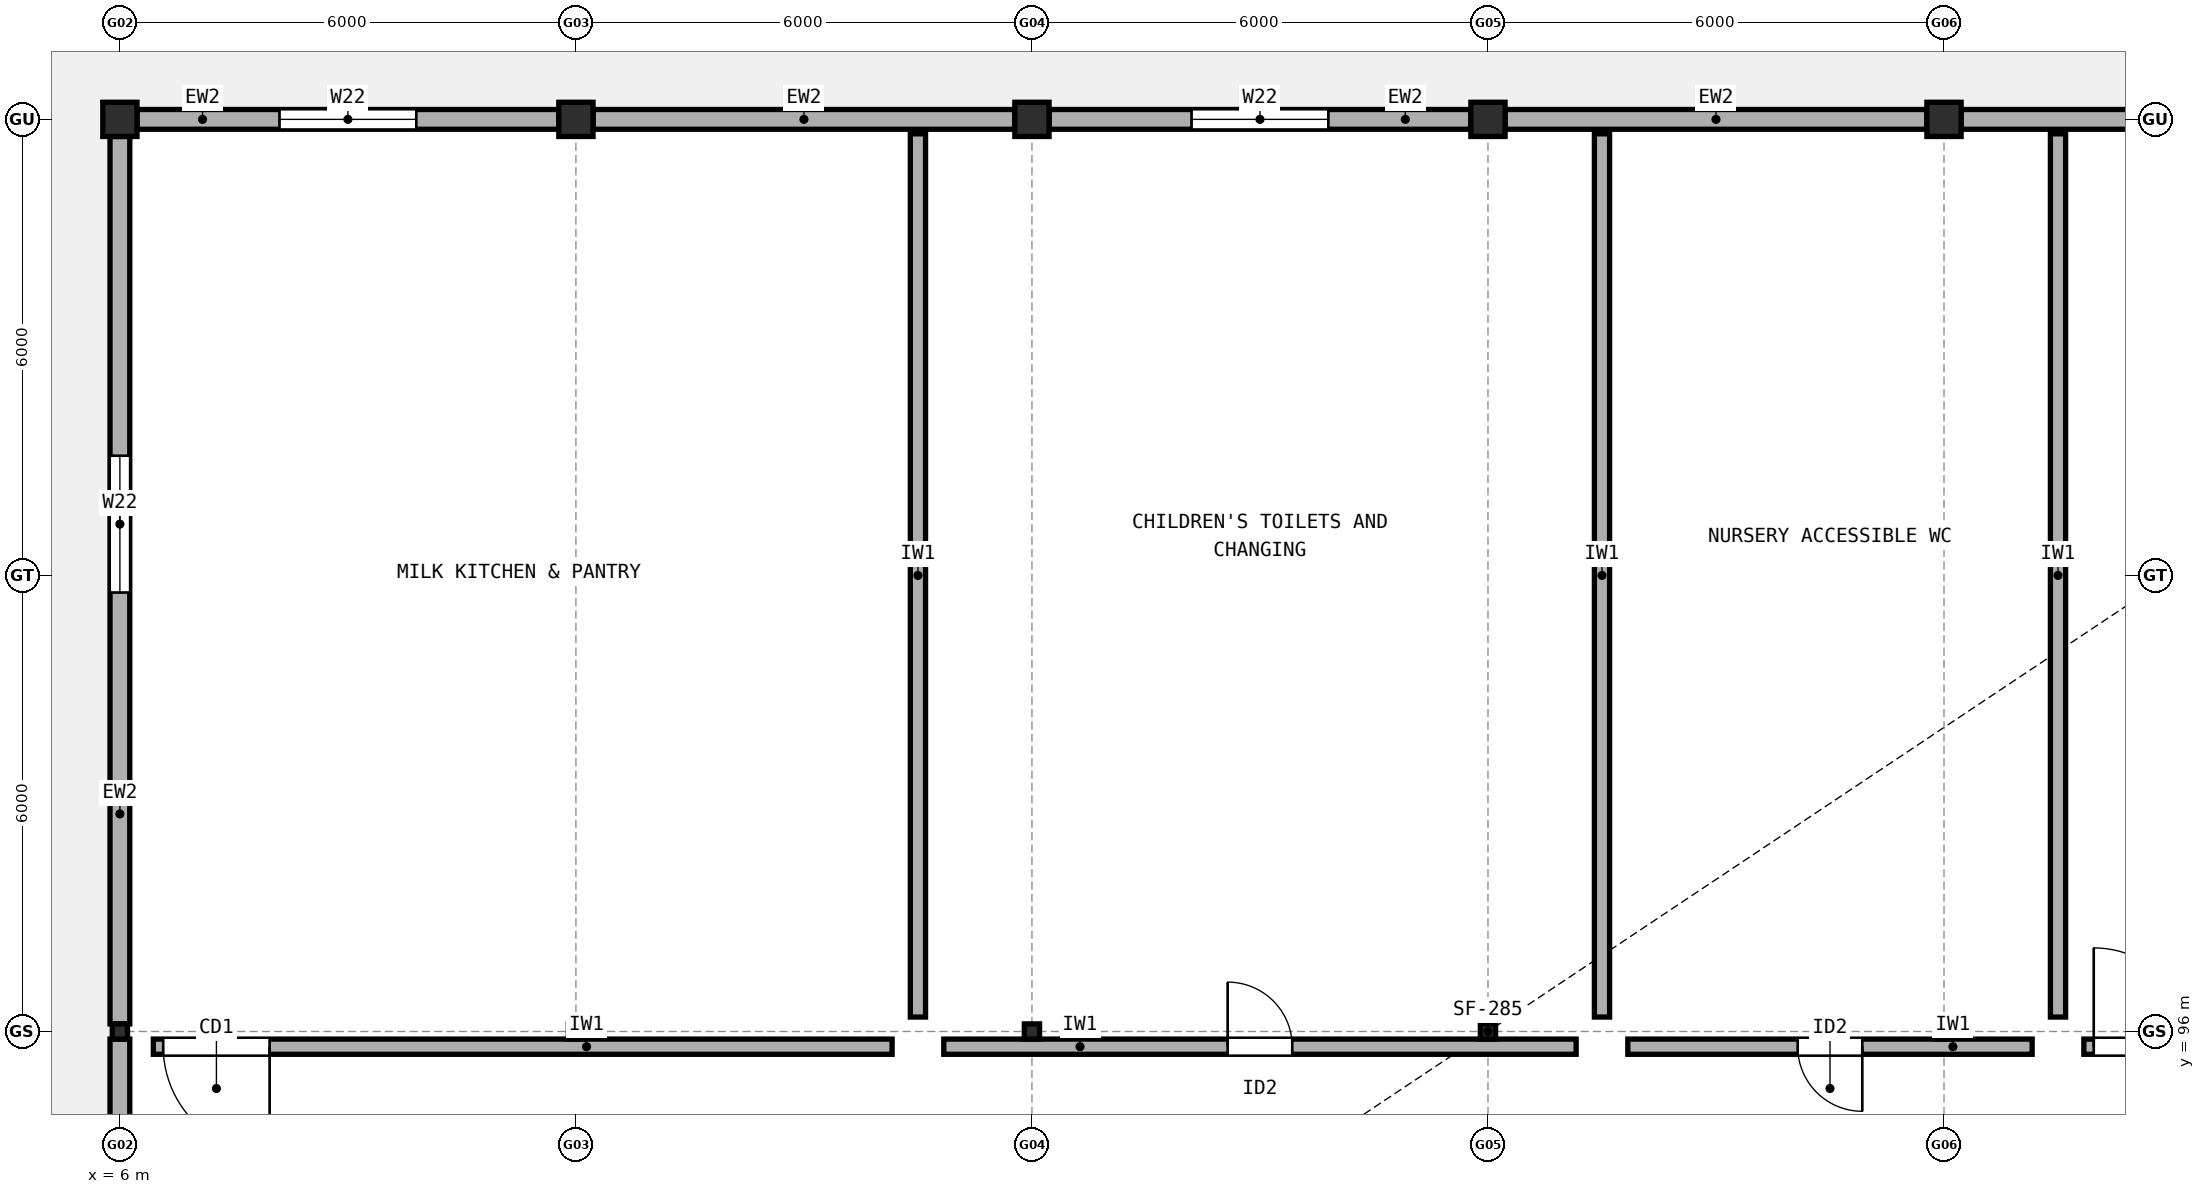
"""IFC4 building model, lengths in metres.
Left out: names, types, materials, properties, quantities, classifications, styles, units other than length and angle.
Written with IfcOpenShell. Run it as: python <this file> out.ifc"""

import sys

from ifc_helpers import new_model, si_unit, direction, frame, frame_2d, origin, origin_2d, place, context, subcontext, project, spatial, rectangle, i_section, extrude, element, fill, save


model = new_model("IFC4")
c1 = context("Model", 3, precision=1e-05, world=origin(), true_north=direction((0.0, 1.0)))
c2 = subcontext(c1, "Body", "Model", "MODEL_VIEW")
j1 = project(units=[si_unit("LENGTHUNIT", "METRE"), si_unit("PLANEANGLEUNIT", "RADIAN")], contexts=[c1])
p1 = place(None, origin())
s1 = spatial("IfcSite", under=j1, at=p1, CompositionType="ELEMENT")
p2 = place(p1, origin())
s2 = spatial("IfcBuilding", under=s1, at=p2, CompositionType="ELEMENT")
p3 = place(p2, origin())
s3 = spatial("IfcBuildingStorey", under=s2, at=p3, CompositionType="ELEMENT", Elevation=0.0)
p4 = place(p3, frame((6.0, 96.0, 0.0), z_axis=(0.0, 0.0, 1.0), x_axis=(1.0, 0.0, 0.0)))
e1 = element("IfcColumn", 1, at=p4, inside=s3, PredefinedType="COLUMN", context=c2, shape_type="SweptSolid", body=[
    extrude(i_section(OverallWidth=0.2, OverallDepth=0.2, WebThickness=0.009, FlangeThickness=0.015, FilletRadius=0.018, at=origin_2d()), origin(), (0.0, 0.0, 1.0), 4.23),
])
p5 = place(p3, frame((6.0, 108.0, 0.0), z_axis=(0.0, 0.0, 1.0), x_axis=(1.0, 0.0, 0.0)))
e2 = element("IfcColumn", 2, at=p5, inside=s3, PredefinedType="COLUMN", context=c2, shape_type="SweptSolid", body=[
    extrude(rectangle(XDim=0.45, YDim=0.45, at=origin_2d()), origin(), (0.0, 0.0, 1.0), 4.23),
])
p6 = place(p3, frame((12.0, 96.0, 0.0), z_axis=(0.0, 0.0, 1.0), x_axis=(1.0, 0.0, 0.0)))
e3 = element("IfcColumn", 3, at=p6, inside=s3, PredefinedType="COLUMN", context=c2, shape_type="SweptSolid", body=[
    extrude(i_section(OverallWidth=0.2, OverallDepth=0.2, WebThickness=0.009, FlangeThickness=0.015, FilletRadius=0.018, at=origin_2d()), origin(), (0.0, 0.0, 1.0), 4.23),
])
p7 = place(p3, frame((12.0, 108.0, 0.0), z_axis=(0.0, 0.0, 1.0), x_axis=(1.0, 0.0, 0.0)))
e4 = element("IfcColumn", 4, at=p7, inside=s3, PredefinedType="COLUMN", context=c2, shape_type="SweptSolid", body=[
    extrude(rectangle(XDim=0.45, YDim=0.45, at=origin_2d()), origin(), (0.0, 0.0, 1.0), 4.23),
])
p8 = place(p3, frame((18.0, 96.0, 0.0), z_axis=(0.0, 0.0, 1.0), x_axis=(1.0, 0.0, 0.0)))
e5 = element("IfcColumn", 5, at=p8, inside=s3, PredefinedType="COLUMN", context=c2, shape_type="SweptSolid", body=[
    extrude(i_section(OverallWidth=0.2, OverallDepth=0.2, WebThickness=0.009, FlangeThickness=0.015, FilletRadius=0.018, at=origin_2d()), origin(), (0.0, 0.0, 1.0), 4.23),
])
p9 = place(p3, frame((18.0, 108.0, 0.0), z_axis=(0.0, 0.0, 1.0), x_axis=(1.0, 0.0, 0.0)))
e6 = element("IfcColumn", 6, at=p9, inside=s3, PredefinedType="COLUMN", context=c2, shape_type="SweptSolid", body=[
    extrude(rectangle(XDim=0.45, YDim=0.45, at=origin_2d()), origin(), (0.0, 0.0, 1.0), 4.23),
])
p10 = place(p3, frame((24.0, 96.0, 0.0), z_axis=(0.0, 0.0, 1.0), x_axis=(1.0, 0.0, 0.0)))
e7 = element("IfcColumn", 7, at=p10, inside=s3, PredefinedType="COLUMN", context=c2, shape_type="SweptSolid", body=[
    extrude(i_section(OverallWidth=0.2, OverallDepth=0.2, WebThickness=0.009, FlangeThickness=0.015, FilletRadius=0.018, at=origin_2d()), origin(), (0.0, 0.0, 1.0), 4.23),
])
p11 = place(p3, frame((24.0, 108.0, 0.0), z_axis=(0.0, 0.0, 1.0), x_axis=(1.0, 0.0, 0.0)))
e8 = element("IfcColumn", 8, at=p11, inside=s3, PredefinedType="COLUMN", context=c2, shape_type="SweptSolid", body=[
    extrude(rectangle(XDim=0.45, YDim=0.45, at=origin_2d()), origin(), (0.0, 0.0, 1.0), 4.23),
])
p12 = place(p3, frame((30.0, 96.0, 0.0), z_axis=(0.0, 0.0, 1.0), x_axis=(1.0, 0.0, 0.0)))
e9 = element("IfcColumn", 9, at=p12, inside=s3, PredefinedType="COLUMN", context=c2, shape_type="SweptSolid", body=[
    extrude(i_section(OverallWidth=0.2, OverallDepth=0.2, WebThickness=0.009, FlangeThickness=0.015, FilletRadius=0.018, at=origin_2d()), origin(), (0.0, 0.0, 1.0), 4.23),
])
p13 = place(p3, frame((30.0, 108.0, 0.0), z_axis=(0.0, 0.0, 1.0), x_axis=(1.0, 0.0, 0.0)))
e10 = element("IfcColumn", 10, at=p13, inside=s3, PredefinedType="COLUMN", context=c2, shape_type="SweptSolid", body=[
    extrude(rectangle(XDim=0.45, YDim=0.45, at=origin_2d()), origin(), (0.0, 0.0, 1.0), 4.23),
])
p14 = place(p3, frame((11.775, 108.0, 0.0), z_axis=(0.0, 0.0, 1.0), x_axis=(-1.0, 0.0, 0.0)))
e11 = element("IfcWall", 11, at=p14, inside=s3, PredefinedType="STANDARD", context=c2, shape_type="SweptSolid", body=[
    extrude(rectangle(XDim=5.55, YDim=0.26, at=frame_2d((2.775, 0.0))), origin(), (0.0, 0.0, 1.0), 3.112),
])
p15 = place(p14, frame((1.875, 0.0, 0.85)))
e12 = element("IfcOpeningElement", 12, at=p15, cuts=e11, PredefinedType="OPENING", context=c2, shape_type="SweptSolid", body=[
    extrude(rectangle(XDim=1.8, YDim=1.45, at=frame_2d((0.9, 0.725))), frame((0.0, 0.14, 0.0), z_axis=(0.0, -1.0, 0.0), x_axis=(1.0, 0.0, 0.0)), (0.0, 0.0, 1.0), 0.28),
])
p16 = place(p3, frame((17.775, 108.0, 0.0), z_axis=(0.0, 0.0, 1.0), x_axis=(-1.0, 0.0, 0.0)))
e13 = element("IfcWall", 13, at=p16, inside=s3, PredefinedType="STANDARD", context=c2, shape_type="SweptSolid", body=[
    extrude(rectangle(XDim=5.55, YDim=0.26, at=frame_2d((2.775, 0.0))), origin(), (0.0, 0.0, 1.0), 3.112),
])
p17 = place(p3, frame((23.775, 108.0, 0.0), z_axis=(0.0, 0.0, 1.0), x_axis=(-1.0, 0.0, 0.0)))
e14 = element("IfcWall", 14, at=p17, inside=s3, PredefinedType="STANDARD", context=c2, shape_type="SweptSolid", body=[
    extrude(rectangle(XDim=5.55, YDim=0.26, at=frame_2d((2.775, 0.0))), origin(), (0.0, 0.0, 1.0), 3.112),
])
p18 = place(p17, frame((1.875, 0.0, 0.85)))
e15 = element("IfcOpeningElement", 15, at=p18, cuts=e14, PredefinedType="OPENING", context=c2, shape_type="SweptSolid", body=[
    extrude(rectangle(XDim=1.8, YDim=1.45, at=frame_2d((0.9, 0.725))), frame((0.0, 0.14, 0.0), z_axis=(0.0, -1.0, 0.0), x_axis=(1.0, 0.0, 0.0)), (0.0, 0.0, 1.0), 0.28),
])
for number, where, z_axis, x_axis in (
    (16, (29.775, 108.0, 0.0), (0.0, 0.0, 1.0), (-1.0, 0.0, 0.0)),
    (17, (35.775, 108.0, 0.0), (0.0, 0.0, 1.0), (-1.0, 0.0, 0.0)),
):
    element("IfcWall", number, at=place(p3, frame(where, z_axis=z_axis, x_axis=x_axis)), inside=s3, PredefinedType="STANDARD", context=c2, shape_type="SweptSolid", body=[
        extrude(rectangle(XDim=5.55, YDim=0.26, at=frame_2d((2.775, 0.0))), origin(), (0.0, 0.0, 1.0), 3.112),
    ])
p19 = place(p3, frame((6.0, 95.9, 0.0), z_axis=(0.0, 0.0, 1.0), x_axis=(0.0, -1.0, 0.0)))
e18 = element("IfcWall", 18, at=p19, inside=s3, PredefinedType="STANDARD", context=c2, shape_type="SweptSolid", body=[
    extrude(rectangle(XDim=11.675, YDim=0.26, at=frame_2d((5.837, 0.0))), origin(), (0.0, 0.0, 1.0), 2.912),
])
p20 = place(p19, frame((4.2, 0.0, 0.85)))
e19 = element("IfcOpeningElement", 19, at=p20, cuts=e18, PredefinedType="OPENING", context=c2, shape_type="SweptSolid", body=[
    extrude(rectangle(XDim=1.8, YDim=1.45, at=frame_2d((0.9, 0.725))), frame((0.0, 0.14, 0.0), z_axis=(0.0, -1.0, 0.0), x_axis=(1.0, 0.0, 0.0)), (0.0, 0.0, 1.0), 0.28),
])
p21 = place(p3, frame((6.0, 107.775, 0.0), z_axis=(0.0, 0.0, 1.0), x_axis=(0.0, -1.0, 0.0)))
e20 = element("IfcWall", 20, at=p21, inside=s3, PredefinedType="STANDARD", context=c2, shape_type="SweptSolid", body=[
    extrude(rectangle(XDim=11.675, YDim=0.26, at=frame_2d((5.837, 0.0))), origin(), (0.0, 0.0, 1.0), 2.912),
])
p22 = place(p21, frame((4.2, 0.0, 0.85)))
e21 = element("IfcOpeningElement", 21, at=p22, cuts=e20, PredefinedType="OPENING", context=c2, shape_type="SweptSolid", body=[
    extrude(rectangle(XDim=1.8, YDim=1.45, at=frame_2d((0.9, 0.725))), frame((0.0, 0.14, 0.0), z_axis=(0.0, -1.0, 0.0), x_axis=(1.0, 0.0, 0.0)), (0.0, 0.0, 1.0), 0.28),
])
p23 = place(p3, frame((6.44, 95.8, 0.0), z_axis=(0.0, 0.0, 1.0), x_axis=(1.0, 0.0, 0.0)))
e22 = element("IfcWall", 22, at=p23, inside=s3, PredefinedType="SOLIDWALL", context=c2, shape_type="SweptSolid", body=[
    extrude(rectangle(XDim=9.72, YDim=0.2, at=frame_2d((4.86, 0.0))), origin(), (0.0, 0.0, 1.0), 3.562),
])
p24 = place(p23, frame((0.13, 0.0, 0.0)))
e23 = element("IfcOpeningElement", 23, at=p24, cuts=e22, PredefinedType="OPENING", context=c2, shape_type="SweptSolid", body=[
    extrude(rectangle(XDim=1.4, YDim=2.15, at=frame_2d((0.7, 1.075))), frame((0.0, 0.11, 0.0), z_axis=(0.0, -1.0, 0.0), x_axis=(1.0, 0.0, 0.0)), (0.0, 0.0, 1.0), 0.22),
])
p25 = place(p3, frame((16.5, 96.19, 0.0), z_axis=(0.0, 0.0, 1.0), x_axis=(0.0, 1.0, 0.0)))
e24 = element("IfcWall", 24, at=p25, inside=s3, PredefinedType="SOLIDWALL", context=c2, shape_type="SweptSolid", body=[
    extrude(rectangle(XDim=11.62, YDim=0.2, at=frame_2d((5.81, 0.0))), origin(), (0.0, 0.0, 1.0), 3.112),
])
p26 = place(p3, frame((16.84, 95.8, 0.0), z_axis=(0.0, 0.0, 1.0), x_axis=(1.0, 0.0, 0.0)))
e25 = element("IfcWall", 25, at=p26, inside=s3, PredefinedType="SOLIDWALL", context=c2, shape_type="SweptSolid", body=[
    extrude(rectangle(XDim=8.32, YDim=0.2, at=frame_2d((4.16, 0.0))), origin(), (0.0, 0.0, 1.0), 2.912),
])
p27 = place(p26, frame((3.735, 0.0, 0.0)))
e26 = element("IfcOpeningElement", 26, at=p27, cuts=e25, PredefinedType="OPENING", context=c2, shape_type="SweptSolid", body=[
    extrude(rectangle(XDim=0.85, YDim=2.1, at=frame_2d((0.425, 1.05))), frame((0.0, 0.11, 0.0), z_axis=(0.0, -1.0, 0.0), x_axis=(1.0, 0.0, 0.0)), (0.0, 0.0, 1.0), 0.22),
])
p28 = place(p3, frame((25.5, 96.19, 0.0), z_axis=(0.0, 0.0, 1.0), x_axis=(0.0, 1.0, 0.0)))
e27 = element("IfcWall", 27, at=p28, inside=s3, PredefinedType="SOLIDWALL", context=c2, shape_type="SweptSolid", body=[
    extrude(rectangle(XDim=11.62, YDim=0.2, at=frame_2d((5.81, 0.0))), origin(), (0.0, 0.0, 1.0), 3.112),
])
p29 = place(p3, frame((25.84, 95.8, 0.0), z_axis=(0.0, 0.0, 1.0), x_axis=(1.0, 0.0, 0.0)))
e28 = element("IfcWall", 28, at=p29, inside=s3, PredefinedType="SOLIDWALL", context=c2, shape_type="SweptSolid", body=[
    extrude(rectangle(XDim=5.32, YDim=0.2, at=frame_2d((2.66, 0.0))), origin(), (0.0, 0.0, 1.0), 2.912),
])
p30 = place(p29, frame((2.235, 0.0, 0.0)))
e29 = element("IfcOpeningElement", 29, at=p30, cuts=e28, PredefinedType="OPENING", context=c2, shape_type="SweptSolid", body=[
    extrude(rectangle(XDim=0.85, YDim=2.1, at=frame_2d((0.425, 1.05))), frame((0.0, 0.11, 0.0), z_axis=(0.0, -1.0, 0.0), x_axis=(1.0, 0.0, 0.0)), (0.0, 0.0, 1.0), 0.22),
])
p31 = place(p3, frame((31.5, 96.19, 0.0), z_axis=(0.0, 0.0, 1.0), x_axis=(0.0, 1.0, 0.0)))
e30 = element("IfcWall", 30, at=p31, inside=s3, PredefinedType="SOLIDWALL", context=c2, shape_type="SweptSolid", body=[
    extrude(rectangle(XDim=11.62, YDim=0.2, at=frame_2d((5.81, 0.0))), origin(), (0.0, 0.0, 1.0), 3.112),
])
p32 = place(p3, frame((31.84, 95.8, 0.0), z_axis=(0.0, 0.0, 1.0), x_axis=(1.0, 0.0, 0.0)))
e31 = element("IfcWall", 31, at=p32, inside=s3, PredefinedType="SOLIDWALL", context=c2, shape_type="SweptSolid", body=[
    extrude(rectangle(XDim=9.72, YDim=0.2, at=frame_2d((4.86, 0.0))), origin(), (0.0, 0.0, 1.0), 2.912),
])
p33 = place(p32, frame((0.13, 0.0, 0.0)))
e32 = element("IfcOpeningElement", 32, at=p33, cuts=e31, PredefinedType="OPENING", context=c2, shape_type="SweptSolid", body=[
    extrude(rectangle(XDim=1.3, YDim=2.15, at=frame_2d((0.65, 1.075))), frame((0.0, 0.11, 0.0), z_axis=(0.0, -1.0, 0.0), x_axis=(1.0, 0.0, 0.0)), (0.0, 0.0, 1.0), 0.22),
])
p34 = place(p15, origin())
e33 = element("IfcWindow", 33, at=p34, inside=s3, PartitioningType="SINGLE_PANEL", PredefinedType="WINDOW", context=c2, shape_type="SweptSolid", body=[
    extrude(rectangle(XDim=1.8, YDim=1.45, at=frame_2d((0.9, 0.725))), frame((0.0, 0.03, 0.0), z_axis=(0.0, -1.0, 0.0), x_axis=(1.0, 0.0, 0.0)), (0.0, 0.0, 1.0), 0.06),
])
fill(e12, e33)
p35 = place(p18, origin())
e34 = element("IfcWindow", 34, at=p35, inside=s3, PartitioningType="SINGLE_PANEL", PredefinedType="WINDOW", context=c2, shape_type="SweptSolid", body=[
    extrude(rectangle(XDim=1.8, YDim=1.45, at=frame_2d((0.9, 0.725))), frame((0.0, 0.03, 0.0), z_axis=(0.0, -1.0, 0.0), x_axis=(1.0, 0.0, 0.0)), (0.0, 0.0, 1.0), 0.06),
])
fill(e15, e34)
p36 = place(p22, origin())
e35 = element("IfcWindow", 35, at=p36, inside=s3, PartitioningType="SINGLE_PANEL", PredefinedType="WINDOW", context=c2, shape_type="SweptSolid", body=[
    extrude(rectangle(XDim=1.8, YDim=1.45, at=frame_2d((0.9, 0.725))), frame((0.0, 0.03, 0.0), z_axis=(0.0, -1.0, 0.0), x_axis=(1.0, 0.0, 0.0)), (0.0, 0.0, 1.0), 0.06),
])
fill(e21, e35)
p37 = place(p24, origin())
e36 = element("IfcDoor", 36, at=p37, inside=s3, OperationType="SINGLE_SWING_RIGHT", PredefinedType="DOOR", context=c2, shape_type="SweptSolid", body=[
    extrude(rectangle(XDim=1.4, YDim=2.15, at=frame_2d((0.7, 1.075))), frame((0.0, 0.025, 0.0), z_axis=(0.0, -1.0, 0.0), x_axis=(1.0, 0.0, 0.0)), (0.0, 0.0, 1.0), 0.05),
])
fill(e23, e36)
p38 = place(p27, origin())
e37 = element("IfcDoor", 37, at=p38, inside=s3, OperationType="SINGLE_SWING_LEFT", PredefinedType="DOOR", context=c2, shape_type="SweptSolid", body=[
    extrude(rectangle(XDim=0.85, YDim=2.1, at=frame_2d((0.425, 1.05))), frame((0.0, 0.025, 0.0), z_axis=(0.0, -1.0, 0.0), x_axis=(1.0, 0.0, 0.0)), (0.0, 0.0, 1.0), 0.05),
])
fill(e26, e37)
p39 = place(p30, origin())
e38 = element("IfcDoor", 38, at=p39, inside=s3, OperationType="SINGLE_SWING_RIGHT", PredefinedType="DOOR", context=c2, shape_type="SweptSolid", body=[
    extrude(rectangle(XDim=0.85, YDim=2.1, at=frame_2d((0.425, 1.05))), frame((0.0, 0.025, 0.0), z_axis=(0.0, -1.0, 0.0), x_axis=(1.0, 0.0, 0.0)), (0.0, 0.0, 1.0), 0.05),
])
fill(e29, e38)
p40 = place(p33, origin())
e39 = element("IfcDoor", 39, at=p40, inside=s3, OperationType="SINGLE_SWING_LEFT", PredefinedType="DOOR", context=c2, shape_type="SweptSolid", body=[
    extrude(rectangle(XDim=1.3, YDim=2.15, at=frame_2d((0.65, 1.075))), frame((0.0, 0.025, 0.0), z_axis=(0.0, -1.0, 0.0), x_axis=(1.0, 0.0, 0.0)), (0.0, 0.0, 1.0), 0.05),
])
fill(e32, e39)
save(model, sys.argv[1])
